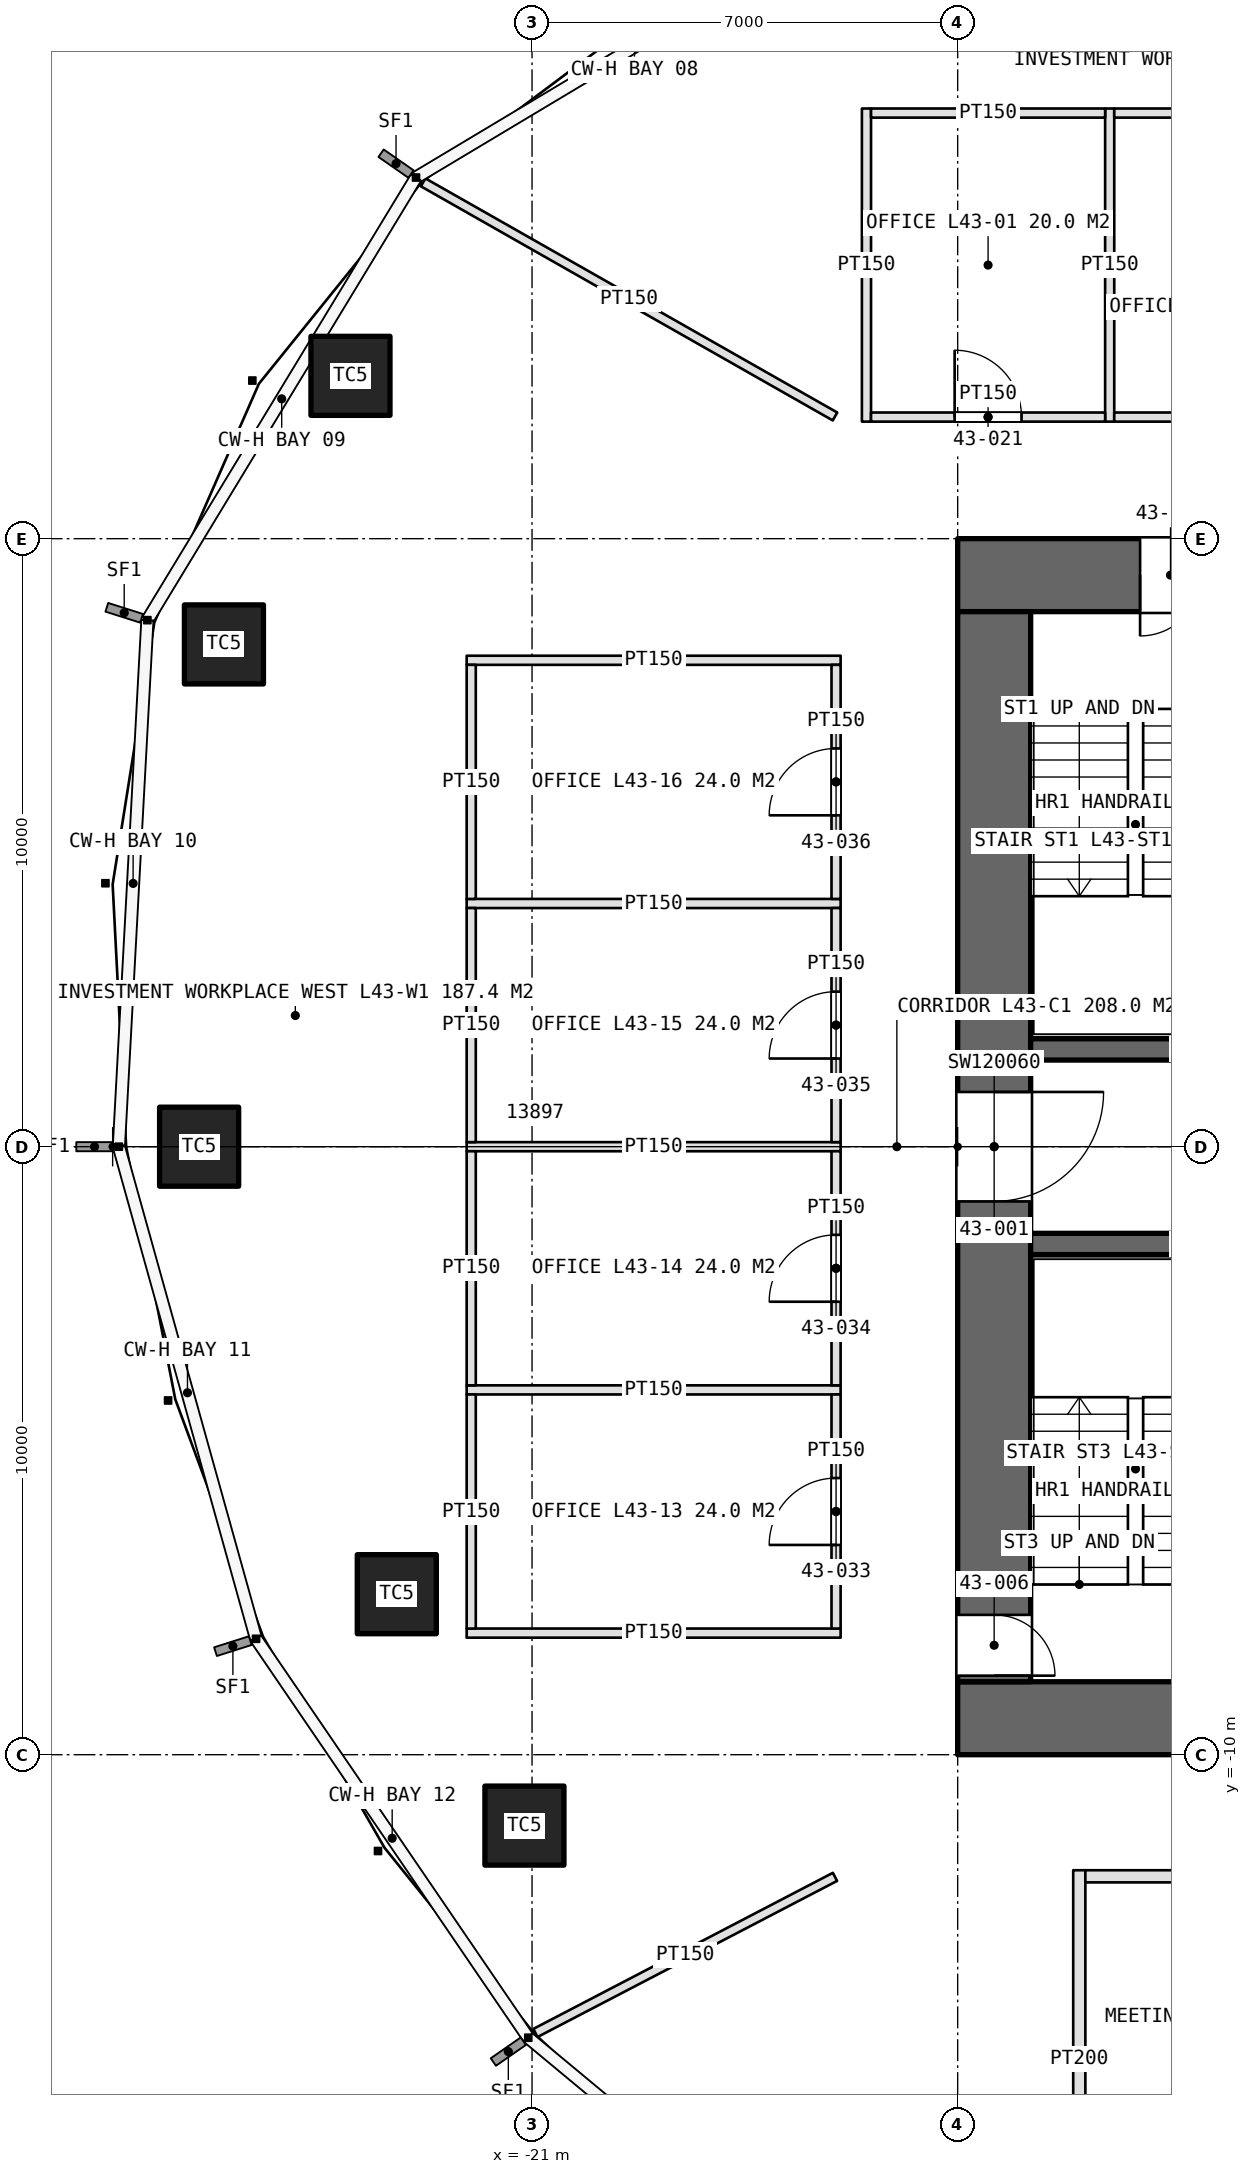
"""IFC4 building model, lengths in metres.
Left out: names, types, materials, properties, quantities, classifications, styles, units other than length and angle.
Written with IfcOpenShell. Run it as: python <this file> out.ifc"""

import sys

from ifc_helpers import new_model, si_unit, direction, frame, frame_2d, origin, origin_2d, place, context, subcontext, project, spatial, rectangle, extrude, element, fill, save


model = new_model("IFC4")
c1 = context("Model", 3, precision=1e-05, world=origin(), true_north=direction((0.0, 1.0)))
c2 = subcontext(c1, "Body", "Model", "MODEL_VIEW")
j1 = project(units=[si_unit("LENGTHUNIT", "METRE"), si_unit("PLANEANGLEUNIT", "RADIAN")], contexts=[c1])
p1 = place(None, origin())
s1 = spatial("IfcSite", under=j1, at=p1, CompositionType="ELEMENT")
p2 = place(p1, origin())
s2 = spatial("IfcBuilding", under=s1, at=p2, CompositionType="ELEMENT")
p3 = place(p2, frame((0.0, 0.0, 199.0)))
s3 = spatial("IfcBuildingStorey", under=s2, at=p3, CompositionType="ELEMENT", Elevation=199.0)
p4 = place(p3, frame((-14.0, -9.4, 0.0), z_axis=(0.0, 0.0, 1.0), x_axis=(1.0, 0.0, 0.0)))
e1 = element("IfcWall", 1, at=p4, inside=s3, PredefinedType="SHEAR", context=c2, shape_type="SweptSolid", body=[
    extrude(rectangle(XDim=28.0, YDim=1.2, at=frame_2d((14.0, 0.0))), origin(), (0.0, 0.0, 1.0), 4.2),
])
p5 = place(p4, frame((22.9, 0.0, 0.0)))
e2 = element("IfcOpeningElement", 2, at=p5, cuts=e1, PredefinedType="OPENING", context=c2, shape_type="SweptSolid", body=[
    extrude(rectangle(XDim=2.2, YDim=2.7, at=frame_2d((1.1, 1.35))), frame((0.0, 0.61, 0.0), z_axis=(0.0, -1.0, 0.0), x_axis=(1.0, 0.0, 0.0)), (0.0, 0.0, 1.0), 1.22),
])
p6 = place(p3, frame((14.0, 9.4, 0.0), z_axis=(0.0, 0.0, 1.0), x_axis=(-1.0, 0.0, 0.0)))
e3 = element("IfcWall", 3, at=p6, inside=s3, PredefinedType="SHEAR", context=c2, shape_type="SweptSolid", body=[
    extrude(rectangle(XDim=28.0, YDim=1.2, at=frame_2d((14.0, 0.0))), origin(), (0.0, 0.0, 1.0), 4.2),
])
p7 = place(p6, frame((24.0, 0.0, 0.0)))
e4 = element("IfcOpeningElement", 4, at=p7, cuts=e3, PredefinedType="OPENING", context=c2, shape_type="SweptSolid", body=[
    extrude(rectangle(XDim=1.0, YDim=2.4, at=frame_2d((0.5, 1.2))), frame((0.0, 0.61, 0.0), z_axis=(0.0, -1.0, 0.0), x_axis=(1.0, 0.0, 0.0)), (0.0, 0.0, 1.0), 1.22),
])
p8 = place(p3, frame((-13.4, 8.8, 0.0), z_axis=(0.0, 0.0, 1.0), x_axis=(0.0, -1.0, 0.0)))
e5 = element("IfcWall", 5, at=p8, inside=s3, PredefinedType="SHEAR", context=c2, shape_type="SweptSolid", body=[
    extrude(rectangle(XDim=17.6, YDim=1.2, at=frame_2d((8.8, 0.0))), origin(), (0.0, 0.0, 1.0), 4.2),
])
p9 = place(p8, frame((7.9, 0.0, 0.0)))
e6 = element("IfcOpeningElement", 6, at=p9, cuts=e5, PredefinedType="OPENING", context=c2, shape_type="SweptSolid", body=[
    extrude(rectangle(XDim=1.8, YDim=2.4, at=frame_2d((0.9, 1.2))), frame((0.0, 0.61, 0.0), z_axis=(0.0, -1.0, 0.0), x_axis=(1.0, 0.0, 0.0)), (0.0, 0.0, 1.0), 1.22),
])
p10 = place(p8, frame((16.5, 0.0, 0.0)))
e7 = element("IfcOpeningElement", 7, at=p10, cuts=e5, PredefinedType="OPENING", context=c2, shape_type="SweptSolid", body=[
    extrude(rectangle(XDim=1.0, YDim=2.4, at=frame_2d((0.5, 1.2))), frame((0.0, 0.61, 0.0), z_axis=(0.0, -1.0, 0.0), x_axis=(1.0, 0.0, 0.0)), (0.0, 0.0, 1.0), 1.22),
])
for number, where, z_axis, x_axis in (
    (8, (-12.8, 1.6, 0.0), (0.0, 0.0, 1.0), (1.0, 0.0, 0.0)),
    (9, (-12.8, -1.6, 0.0), (0.0, 0.0, 1.0), (1.0, 0.0, 0.0)),
):
    element("IfcWall", number, at=place(p3, frame(where, z_axis=z_axis, x_axis=x_axis)), inside=s3, PredefinedType="SHEAR", context=c2, shape_type="SweptSolid", body=[
        extrude(rectangle(XDim=5.6, YDim=0.35, at=frame_2d((2.8, 0.0))), origin(), (0.0, 0.0, 1.0), 4.2),
    ])
for number, where, z_axis, x_axis in (
    (10, (-23.986, 12.678, 0.0), (0.0, 0.0, 1.0), (1.0, 0.0, 0.0)),
    (11, (-26.067, 8.261, 0.0), (0.0, 0.0, 1.0), (1.0, 0.0, 0.0)),
    (12, (-26.475, 0.0, 0.0), (0.0, 0.0, 1.0), (1.0, 0.0, 0.0)),
    (13, (-23.224, -7.36, 0.0), (0.0, 0.0, 1.0), (1.0, 0.0, 0.0)),
    (14, (-21.125, -11.166, 0.0), (0.0, 0.0, 1.0), (1.0, 0.0, 0.0)),
):
    element("IfcColumn", number, at=place(p3, frame(where, z_axis=z_axis, x_axis=x_axis)), inside=s3, PredefinedType="COLUMN", context=c2, shape_type="SweptSolid", body=[
        extrude(rectangle(XDim=1.3, YDim=1.3, at=origin_2d()), origin(), (0.0, 0.0, 1.0), 4.2),
    ])
for number, where, z_axis, x_axis in (
    (15, (-15.5, 11.925, 0.0), (0.0, 0.0, 1.0), (0.0, 1.0, 0.0)),
    (16, (-11.5, 11.925, 0.0), (0.0, 0.0, 1.0), (0.0, 1.0, 0.0)),
):
    element("IfcWall", number, at=place(p3, frame(where, z_axis=z_axis, x_axis=x_axis)), inside=s3, PredefinedType="PARTITIONING", context=c2, shape_type="SweptSolid", body=[
        extrude(rectangle(XDim=5.15, YDim=0.15, at=frame_2d((2.575, 0.0))), origin(), (0.0, 0.0, 1.0), 3.0),
    ])
p11 = place(p3, frame((-15.425, 12.0, 0.0), z_axis=(0.0, 0.0, 1.0), x_axis=(1.0, 0.0, 0.0)))
e17 = element("IfcWall", 17, at=p11, inside=s3, PredefinedType="PARTITIONING", context=c2, shape_type="SweptSolid", body=[
    extrude(rectangle(XDim=3.85, YDim=0.15, at=frame_2d((1.925, 0.0))), origin(), (0.0, 0.0, 1.0), 3.0),
])
p12 = place(p11, frame((1.375, 0.0, 0.0)))
e18 = element("IfcOpeningElement", 18, at=p12, cuts=e17, PredefinedType="OPENING", context=c2, shape_type="SweptSolid", body=[
    extrude(rectangle(XDim=1.1, YDim=2.3, at=frame_2d((0.55, 1.15))), frame((0.0, 0.085, 0.0), z_axis=(0.0, -1.0, 0.0), x_axis=(1.0, 0.0, 0.0)), (0.0, 0.0, 1.0), 0.17),
])
p13 = place(p3, frame((-15.425, 17.0, 0.0), z_axis=(0.0, 0.0, 1.0), x_axis=(1.0, 0.0, 0.0)))
e19 = element("IfcWall", 19, at=p13, inside=s3, PredefinedType="PARTITIONING", context=c2, shape_type="SweptSolid", body=[
    extrude(rectangle(XDim=3.85, YDim=0.15, at=frame_2d((1.925, 0.0))), origin(), (0.0, 0.0, 1.0), 3.0),
])
p14 = place(p3, frame((-11.425, 12.0, 0.0), z_axis=(0.0, 0.0, 1.0), x_axis=(1.0, 0.0, 0.0)))
e20 = element("IfcWall", 20, at=p14, inside=s3, PredefinedType="PARTITIONING", context=c2, shape_type="SweptSolid", body=[
    extrude(rectangle(XDim=3.85, YDim=0.15, at=frame_2d((1.925, 0.0))), origin(), (0.0, 0.0, 1.0), 3.0),
])
p15 = place(p14, frame((1.375, 0.0, 0.0)))
e21 = element("IfcOpeningElement", 21, at=p15, cuts=e20, PredefinedType="OPENING", context=c2, shape_type="SweptSolid", body=[
    extrude(rectangle(XDim=1.1, YDim=2.3, at=frame_2d((0.55, 1.15))), frame((0.0, 0.085, 0.0), z_axis=(0.0, -1.0, 0.0), x_axis=(1.0, 0.0, 0.0)), (0.0, 0.0, 1.0), 0.17),
])
p16 = place(p3, frame((-11.425, 17.0, 0.0), z_axis=(0.0, 0.0, 1.0), x_axis=(1.0, 0.0, 0.0)))
e22 = element("IfcWall", 22, at=p16, inside=s3, PredefinedType="PARTITIONING", context=c2, shape_type="SweptSolid", body=[
    extrude(rectangle(XDim=3.85, YDim=0.15, at=frame_2d((1.925, 0.0))), origin(), (0.0, 0.0, 1.0), 3.0),
])
p17 = place(p3, frame((-12.0, -11.9, 0.0), z_axis=(0.0, 0.0, 1.0), x_axis=(0.0, -1.0, 0.0)))
e23 = element("IfcWall", 23, at=p17, inside=s3, PredefinedType="PARTITIONING", context=c2, shape_type="SweptSolid", body=[
    extrude(rectangle(XDim=6.2, YDim=0.2, at=frame_2d((3.1, 0.0))), origin(), (0.0, 0.0, 1.0), 3.0),
])
p18 = place(p3, frame((-11.9, -12.0, 0.0), z_axis=(0.0, 0.0, 1.0), x_axis=(1.0, 0.0, 0.0)))
e24 = element("IfcWall", 24, at=p18, inside=s3, PredefinedType="PARTITIONING", context=c2, shape_type="SweptSolid", body=[
    extrude(rectangle(XDim=5.8, YDim=0.2, at=frame_2d((2.9, 0.0))), origin(), (0.0, 0.0, 1.0), 3.0),
])
p19 = place(p18, frame((2.3, 0.0, 0.0)))
e25 = element("IfcOpeningElement", 25, at=p19, cuts=e24, PredefinedType="OPENING", context=c2, shape_type="SweptSolid", body=[
    extrude(rectangle(XDim=1.2, YDim=2.4, at=frame_2d((0.6, 1.2))), frame((0.0, 0.11, 0.0), z_axis=(0.0, -1.0, 0.0), x_axis=(1.0, 0.0, 0.0)), (0.0, 0.0, 1.0), 0.22),
])
for number, where, z_axis, x_axis in (
    (26, (-15.925, -8.0, 0.0), (0.0, 0.0, 1.0), (-1.0, 0.0, 0.0)),
    (27, (-15.925, -4.0, 0.0), (0.0, 0.0, 1.0), (-1.0, 0.0, 0.0)),
    (28, (-15.925, 0.0, 0.0), (0.0, 0.0, 1.0), (-1.0, 0.0, 0.0)),
    (29, (-15.925, 4.0, 0.0), (0.0, 0.0, 1.0), (-1.0, 0.0, 0.0)),
    (30, (-15.925, 8.0, 0.0), (0.0, 0.0, 1.0), (-1.0, 0.0, 0.0)),
):
    element("IfcWall", number, at=place(p3, frame(where, z_axis=z_axis, x_axis=x_axis)), inside=s3, PredefinedType="PARTITIONING", context=c2, shape_type="SweptSolid", body=[
        extrude(rectangle(XDim=6.15, YDim=0.15, at=frame_2d((3.075, 0.0))), origin(), (0.0, 0.0, 1.0), 3.0),
    ])
p20 = place(p3, frame((-16.0, -7.925, 0.0), z_axis=(0.0, 0.0, 1.0), x_axis=(0.0, 1.0, 0.0)))
e31 = element("IfcWall", 31, at=p20, inside=s3, PredefinedType="PARTITIONING", context=c2, shape_type="SweptSolid", body=[
    extrude(rectangle(XDim=3.85, YDim=0.15, at=frame_2d((1.925, 0.0))), origin(), (0.0, 0.0, 1.0), 3.0),
])
p21 = place(p20, frame((1.375, 0.0, 0.0)))
e32 = element("IfcOpeningElement", 32, at=p21, cuts=e31, PredefinedType="OPENING", context=c2, shape_type="SweptSolid", body=[
    extrude(rectangle(XDim=1.1, YDim=2.3, at=frame_2d((0.55, 1.15))), frame((0.0, 0.085, 0.0), z_axis=(0.0, -1.0, 0.0), x_axis=(1.0, 0.0, 0.0)), (0.0, 0.0, 1.0), 0.17),
])
p22 = place(p3, frame((-22.0, -7.925, 0.0), z_axis=(0.0, 0.0, 1.0), x_axis=(0.0, 1.0, 0.0)))
e33 = element("IfcWall", 33, at=p22, inside=s3, PredefinedType="PARTITIONING", context=c2, shape_type="SweptSolid", body=[
    extrude(rectangle(XDim=3.85, YDim=0.15, at=frame_2d((1.925, 0.0))), origin(), (0.0, 0.0, 1.0), 3.0),
])
p23 = place(p3, frame((-16.0, -3.925, 0.0), z_axis=(0.0, 0.0, 1.0), x_axis=(0.0, 1.0, 0.0)))
e34 = element("IfcWall", 34, at=p23, inside=s3, PredefinedType="PARTITIONING", context=c2, shape_type="SweptSolid", body=[
    extrude(rectangle(XDim=3.85, YDim=0.15, at=frame_2d((1.925, 0.0))), origin(), (0.0, 0.0, 1.0), 3.0),
])
p24 = place(p23, frame((1.375, 0.0, 0.0)))
e35 = element("IfcOpeningElement", 35, at=p24, cuts=e34, PredefinedType="OPENING", context=c2, shape_type="SweptSolid", body=[
    extrude(rectangle(XDim=1.1, YDim=2.3, at=frame_2d((0.55, 1.15))), frame((0.0, 0.085, 0.0), z_axis=(0.0, -1.0, 0.0), x_axis=(1.0, 0.0, 0.0)), (0.0, 0.0, 1.0), 0.17),
])
p25 = place(p3, frame((-22.0, -3.925, 0.0), z_axis=(0.0, 0.0, 1.0), x_axis=(0.0, 1.0, 0.0)))
e36 = element("IfcWall", 36, at=p25, inside=s3, PredefinedType="PARTITIONING", context=c2, shape_type="SweptSolid", body=[
    extrude(rectangle(XDim=3.85, YDim=0.15, at=frame_2d((1.925, 0.0))), origin(), (0.0, 0.0, 1.0), 3.0),
])
p26 = place(p3, frame((-16.0, 0.075, 0.0), z_axis=(0.0, 0.0, 1.0), x_axis=(0.0, 1.0, 0.0)))
e37 = element("IfcWall", 37, at=p26, inside=s3, PredefinedType="PARTITIONING", context=c2, shape_type="SweptSolid", body=[
    extrude(rectangle(XDim=3.85, YDim=0.15, at=frame_2d((1.925, 0.0))), origin(), (0.0, 0.0, 1.0), 3.0),
])
p27 = place(p26, frame((1.375, 0.0, 0.0)))
e38 = element("IfcOpeningElement", 38, at=p27, cuts=e37, PredefinedType="OPENING", context=c2, shape_type="SweptSolid", body=[
    extrude(rectangle(XDim=1.1, YDim=2.3, at=frame_2d((0.55, 1.15))), frame((0.0, 0.085, 0.0), z_axis=(0.0, -1.0, 0.0), x_axis=(1.0, 0.0, 0.0)), (0.0, 0.0, 1.0), 0.17),
])
p28 = place(p3, frame((-22.0, 0.075, 0.0), z_axis=(0.0, 0.0, 1.0), x_axis=(0.0, 1.0, 0.0)))
e39 = element("IfcWall", 39, at=p28, inside=s3, PredefinedType="PARTITIONING", context=c2, shape_type="SweptSolid", body=[
    extrude(rectangle(XDim=3.85, YDim=0.15, at=frame_2d((1.925, 0.0))), origin(), (0.0, 0.0, 1.0), 3.0),
])
p29 = place(p3, frame((-16.0, 4.075, 0.0), z_axis=(0.0, 0.0, 1.0), x_axis=(0.0, 1.0, 0.0)))
e40 = element("IfcWall", 40, at=p29, inside=s3, PredefinedType="PARTITIONING", context=c2, shape_type="SweptSolid", body=[
    extrude(rectangle(XDim=3.85, YDim=0.15, at=frame_2d((1.925, 0.0))), origin(), (0.0, 0.0, 1.0), 3.0),
])
p30 = place(p29, frame((1.375, 0.0, 0.0)))
e41 = element("IfcOpeningElement", 41, at=p30, cuts=e40, PredefinedType="OPENING", context=c2, shape_type="SweptSolid", body=[
    extrude(rectangle(XDim=1.1, YDim=2.3, at=frame_2d((0.55, 1.15))), frame((0.0, 0.085, 0.0), z_axis=(0.0, -1.0, 0.0), x_axis=(1.0, 0.0, 0.0)), (0.0, 0.0, 1.0), 0.17),
])
p31 = place(p3, frame((-22.0, 4.075, 0.0), z_axis=(0.0, 0.0, 1.0), x_axis=(0.0, 1.0, 0.0)))
e42 = element("IfcWall", 42, at=p31, inside=s3, PredefinedType="PARTITIONING", context=c2, shape_type="SweptSolid", body=[
    extrude(rectangle(XDim=3.85, YDim=0.15, at=frame_2d((1.925, 0.0))), origin(), (0.0, 0.0, 1.0), 3.0),
])
p32 = place(p3, frame((-16.018, -12.009, 0.0), z_axis=(0.0, 0.0, 1.0), x_axis=(-0.886831549241, -0.462092851351, 0.0)))
e43 = element("IfcWall", 43, at=p32, inside=s3, PredefinedType="PARTITIONING", context=c2, shape_type="SweptSolid", body=[
    extrude(rectangle(XDim=5.555, YDim=0.15, at=frame_2d((2.778, 0.0))), origin(), (0.0, 0.0, 1.0), 3.0),
])
p33 = place(p3, frame((-16.017, 12.01, 0.0), z_axis=(0.0, 0.0, 1.0), x_axis=(-0.869357432803, 0.494183826151, 0.0)))
e44 = element("IfcWall", 44, at=p33, inside=s3, PredefinedType="PARTITIONING", context=c2, shape_type="SweptSolid", body=[
    extrude(rectangle(XDim=7.791, YDim=0.15, at=frame_2d((3.896, 0.0))), origin(), (0.0, 0.0, 1.0), 3.0),
])
p34 = place(p9, origin())
e45 = element("IfcDoor", 45, at=p34, inside=s3, OperationType="DOUBLE_DOOR_SINGLE_SWING", PredefinedType="DOOR", context=c2, shape_type="SweptSolid", body=[
    extrude(rectangle(XDim=1.8, YDim=2.4, at=frame_2d((0.9, 1.2))), frame((0.0, 0.025, 0.0), z_axis=(0.0, -1.0, 0.0), x_axis=(1.0, 0.0, 0.0)), (0.0, 0.0, 1.0), 0.05),
])
fill(e6, e45)
p35 = place(p7, origin())
e46 = element("IfcDoor", 46, at=p35, inside=s3, OperationType="SINGLE_SWING_RIGHT", PredefinedType="DOOR", context=c2, shape_type="SweptSolid", body=[
    extrude(rectangle(XDim=1.0, YDim=2.4, at=frame_2d((0.5, 1.2))), frame((0.0, 0.025, 0.0), z_axis=(0.0, -1.0, 0.0), x_axis=(1.0, 0.0, 0.0)), (0.0, 0.0, 1.0), 0.05),
])
fill(e4, e46)
p36 = place(p10, origin())
e47 = element("IfcDoor", 47, at=p36, inside=s3, OperationType="SINGLE_SWING_RIGHT", PredefinedType="DOOR", context=c2, shape_type="SweptSolid", body=[
    extrude(rectangle(XDim=1.0, YDim=2.4, at=frame_2d((0.5, 1.2))), frame((0.0, 0.025, 0.0), z_axis=(0.0, -1.0, 0.0), x_axis=(1.0, 0.0, 0.0)), (0.0, 0.0, 1.0), 0.05),
])
fill(e7, e47)
p37 = place(p12, origin())
e48 = element("IfcDoor", 48, at=p37, inside=s3, OperationType="SINGLE_SWING_LEFT", PredefinedType="DOOR", context=c2, shape_type="SweptSolid", body=[
    extrude(rectangle(XDim=1.1, YDim=2.3, at=frame_2d((0.55, 1.15))), frame((0.0, 0.025, 0.0), z_axis=(0.0, -1.0, 0.0), x_axis=(1.0, 0.0, 0.0)), (0.0, 0.0, 1.0), 0.05),
])
fill(e18, e48)
p38 = place(p21, origin())
e49 = element("IfcDoor", 49, at=p38, inside=s3, OperationType="SINGLE_SWING_LEFT", PredefinedType="DOOR", context=c2, shape_type="SweptSolid", body=[
    extrude(rectangle(XDim=1.1, YDim=2.3, at=frame_2d((0.55, 1.15))), frame((0.0, 0.025, 0.0), z_axis=(0.0, -1.0, 0.0), x_axis=(1.0, 0.0, 0.0)), (0.0, 0.0, 1.0), 0.05),
])
fill(e32, e49)
p39 = place(p24, origin())
e50 = element("IfcDoor", 50, at=p39, inside=s3, OperationType="SINGLE_SWING_LEFT", PredefinedType="DOOR", context=c2, shape_type="SweptSolid", body=[
    extrude(rectangle(XDim=1.1, YDim=2.3, at=frame_2d((0.55, 1.15))), frame((0.0, 0.025, 0.0), z_axis=(0.0, -1.0, 0.0), x_axis=(1.0, 0.0, 0.0)), (0.0, 0.0, 1.0), 0.05),
])
fill(e35, e50)
p40 = place(p27, origin())
e51 = element("IfcDoor", 51, at=p40, inside=s3, OperationType="SINGLE_SWING_LEFT", PredefinedType="DOOR", context=c2, shape_type="SweptSolid", body=[
    extrude(rectangle(XDim=1.1, YDim=2.3, at=frame_2d((0.55, 1.15))), frame((0.0, 0.025, 0.0), z_axis=(0.0, -1.0, 0.0), x_axis=(1.0, 0.0, 0.0)), (0.0, 0.0, 1.0), 0.05),
])
fill(e38, e51)
p41 = place(p30, origin())
e52 = element("IfcDoor", 52, at=p41, inside=s3, OperationType="SINGLE_SWING_LEFT", PredefinedType="DOOR", context=c2, shape_type="SweptSolid", body=[
    extrude(rectangle(XDim=1.1, YDim=2.3, at=frame_2d((0.55, 1.15))), frame((0.0, 0.025, 0.0), z_axis=(0.0, -1.0, 0.0), x_axis=(1.0, 0.0, 0.0)), (0.0, 0.0, 1.0), 0.05),
])
fill(e41, e52)
save(model, sys.argv[1])
